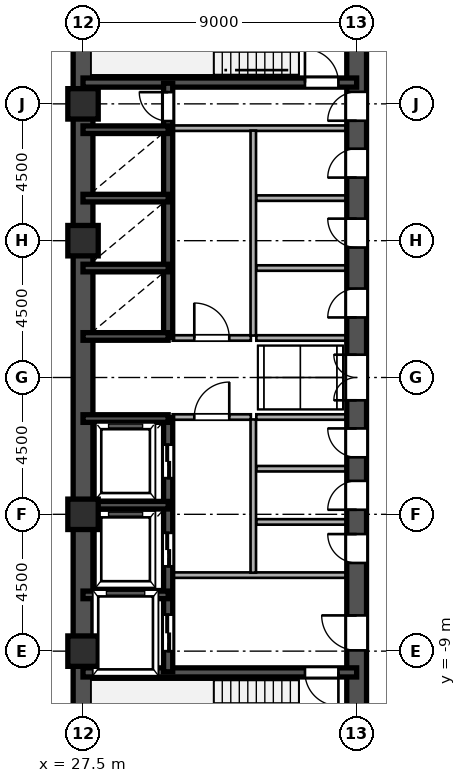
"""IFC4 building model, lengths in metres.
Left out: names, types, materials, properties, quantities, classifications, styles, units other than length and angle.
Written with IfcOpenShell. Run it as: python <this file> out.ifc"""

import sys

from ifc_helpers import new_model, si_unit, direction, frame, frame_2d, origin, origin_2d, place, context, subcontext, project, spatial, rectangle, hollow_rectangle, extrude, source, transform, mapped, element, fill, save


model = new_model("IFC4")
c1 = context("Model", 3, precision=1e-05, world=origin(), true_north=direction((0.0, 1.0)))
c2 = subcontext(c1, "Body", "Model", "MODEL_VIEW")
j1 = project(units=[si_unit("LENGTHUNIT", "METRE"), si_unit("PLANEANGLEUNIT", "RADIAN")], contexts=[c1])
p1 = place(None, origin())
s1 = spatial("IfcSite", under=j1, at=p1, CompositionType="ELEMENT")
p2 = place(p1, origin())
s2 = spatial("IfcBuilding", under=s1, at=p2, CompositionType="ELEMENT")
p3 = place(p2, frame((0.0, 0.0, 76.5)))
s3 = spatial("IfcBuildingStorey", under=s2, at=p3, CompositionType="ELEMENT", Elevation=76.5)
m1 = source(origin(), c2, "Body", "SweptSolid", [
    extrude(hollow_rectangle(XDim=1.0, YDim=1.0, WallThickness=0.042, at=origin_2d()), origin(), (0.0, 0.0, 1.0), 3.6),
])
for number, where, z_axis, x_axis in (
    (1, (27.5, -9.0, 0.0), (0.0, 0.0, 1.0), (1.0, 0.0, 0.0)),
    (2, (27.5, -4.5, 0.0), (0.0, 0.0, 1.0), (1.0, 0.0, 0.0)),
    (3, (27.5, 4.5, 0.0), (0.0, 0.0, 1.0), (1.0, 0.0, 0.0)),
    (4, (27.5, 9.0, 0.0), (0.0, 0.0, 1.0), (1.0, 0.0, 0.0)),
):
    element("IfcColumn", number, at=place(p3, frame(where, z_axis=z_axis, x_axis=x_axis)), inside=s3, PredefinedType="COLUMN", context=c2, shape_type="MappedRepresentation", body=[
        mapped(m1, transform((0.0, 0.0, 0.0), scale=1.0)),
    ])
for number, where, z_axis, x_axis in (
    (5, (27.5, -13.5, 0.0), (0.0, 0.0, 1.0), (0.0, 1.0, 0.0)),
    (6, (27.5, 1.3, 0.0), (0.0, 0.0, 1.0), (0.0, 1.0, 0.0)),
):
    element("IfcWall", number, at=place(p3, frame(where, z_axis=z_axis, x_axis=x_axis)), inside=s3, PredefinedType="SHEAR", context=c2, shape_type="SweptSolid", body=[
        extrude(rectangle(XDim=12.2, YDim=0.65, at=frame_2d((6.1, 0.0))), origin(), (0.0, 0.0, 1.0), 3.38),
    ])
p4 = place(p3, frame((27.5, -1.3, 0.0), z_axis=(0.0, 0.0, 1.0), x_axis=(0.0, 1.0, 0.0)))
e7 = element("IfcWall", 7, at=p4, inside=s3, PredefinedType="SHEAR", context=c2, shape_type="SweptSolid", body=[
    extrude(rectangle(XDim=2.6, YDim=0.65, at=frame_2d((1.3, 0.0))), origin(), (0.0, 0.0, 1.0), 3.38),
])
p5 = place(p3, frame((36.5, -13.65, 0.0), z_axis=(0.0, 0.0, 1.0), x_axis=(0.0, 1.0, 0.0)))
e8 = element("IfcWall", 8, at=p5, inside=s3, PredefinedType="SHEAR", context=c2, shape_type="SweptSolid", body=[
    extrude(rectangle(XDim=7.15, YDim=0.65, at=frame_2d((3.575, 0.0))), origin(), (0.0, 0.0, 1.0), 3.38),
])
p6 = place(p5, frame((4.675, 0.0, 0.0)))
e9 = element("IfcOpeningElement", 9, at=p6, cuts=e8, PredefinedType="OPENING", context=c2, shape_type="SweptSolid", body=[
    extrude(rectangle(XDim=1.15, YDim=2.2, at=frame_2d((0.575, 1.1))), frame((0.0, 0.335, 0.0), z_axis=(0.0, -1.0, 0.0), x_axis=(1.0, 0.0, 0.0)), (0.0, 0.0, 1.0), 0.67),
])
p7 = place(p3, frame((36.5, -1.3, 0.0), z_axis=(0.0, 0.0, 1.0), x_axis=(0.0, 1.0, 0.0)))
e10 = element("IfcWall", 10, at=p7, inside=s3, PredefinedType="SHEAR", context=c2, shape_type="SweptSolid", body=[
    extrude(rectangle(XDim=2.6, YDim=0.65, at=frame_2d((1.3, 0.0))), origin(), (0.0, 0.0, 1.0), 3.38),
])
p8 = place(p7, frame((0.55, 0.0, 0.0)))
e11 = element("IfcOpeningElement", 11, at=p8, cuts=e10, PredefinedType="OPENING", context=c2, shape_type="SweptSolid", body=[
    extrude(rectangle(XDim=1.5, YDim=2.3, at=frame_2d((0.75, 1.15))), frame((0.0, 0.335, 0.0), z_axis=(0.0, -1.0, 0.0), x_axis=(1.0, 0.0, 0.0)), (0.0, 0.0, 1.0), 0.67),
])
p9 = place(p3, frame((36.5, 8.2, 0.0), z_axis=(0.0, 0.0, 1.0), x_axis=(0.0, 1.0, 0.0)))
e12 = element("IfcWall", 12, at=p9, inside=s3, PredefinedType="SHEAR", context=c2, shape_type="SweptSolid", body=[
    extrude(rectangle(XDim=5.45, YDim=0.65, at=frame_2d((2.725, 0.0))), origin(), (0.0, 0.0, 1.0), 3.38),
])
p10 = place(p9, frame((0.245, 0.0, 0.0)))
e13 = element("IfcOpeningElement", 13, at=p10, cuts=e12, PredefinedType="OPENING", context=c2, shape_type="SweptSolid", body=[
    extrude(rectangle(XDim=0.95, YDim=2.15, at=frame_2d((0.475, 1.075))), frame((0.0, 0.335, 0.0), z_axis=(0.0, -1.0, 0.0), x_axis=(1.0, 0.0, 0.0)), (0.0, 0.0, 1.0), 0.67),
])
p11 = place(p3, frame((36.5, -6.5, 0.0), z_axis=(0.0, 0.0, 1.0), x_axis=(0.0, 1.0, 0.0)))
e14 = element("IfcWall", 14, at=p11, inside=s3, PredefinedType="SHEAR", context=c2, shape_type="SweptSolid", body=[
    extrude(rectangle(XDim=1.75, YDim=0.65, at=frame_2d((0.875, 0.0))), origin(), (0.0, 0.0, 1.0), 3.38),
])
p12 = place(p11, frame((0.4, 0.0, 0.0)))
e15 = element("IfcOpeningElement", 15, at=p12, cuts=e14, PredefinedType="OPENING", context=c2, shape_type="SweptSolid", body=[
    extrude(rectangle(XDim=0.95, YDim=2.15, at=frame_2d((0.475, 1.075))), frame((0.0, 0.335, 0.0), z_axis=(0.0, -1.0, 0.0), x_axis=(1.0, 0.0, 0.0)), (0.0, 0.0, 1.0), 0.67),
])
p13 = place(p3, frame((36.5, -4.75, 0.0), z_axis=(0.0, 0.0, 1.0), x_axis=(0.0, 1.0, 0.0)))
e16 = element("IfcWall", 16, at=p13, inside=s3, PredefinedType="SHEAR", context=c2, shape_type="SweptSolid", body=[
    extrude(rectangle(XDim=1.75, YDim=0.65, at=frame_2d((0.875, 0.0))), origin(), (0.0, 0.0, 1.0), 3.38),
])
p14 = place(p13, frame((0.4, 0.0, 0.0)))
e17 = element("IfcOpeningElement", 17, at=p14, cuts=e16, PredefinedType="OPENING", context=c2, shape_type="SweptSolid", body=[
    extrude(rectangle(XDim=0.95, YDim=2.15, at=frame_2d((0.475, 1.075))), frame((0.0, 0.335, 0.0), z_axis=(0.0, -1.0, 0.0), x_axis=(1.0, 0.0, 0.0)), (0.0, 0.0, 1.0), 0.67),
])
p15 = place(p3, frame((36.5, -3.0, 0.0), z_axis=(0.0, 0.0, 1.0), x_axis=(0.0, 1.0, 0.0)))
e18 = element("IfcWall", 18, at=p15, inside=s3, PredefinedType="SHEAR", context=c2, shape_type="SweptSolid", body=[
    extrude(rectangle(XDim=1.7, YDim=0.65, at=frame_2d((0.85, 0.0))), origin(), (0.0, 0.0, 1.0), 3.38),
])
p16 = place(p15, frame((0.375, 0.0, 0.0)))
e19 = element("IfcOpeningElement", 19, at=p16, cuts=e18, PredefinedType="OPENING", context=c2, shape_type="SweptSolid", body=[
    extrude(rectangle(XDim=0.95, YDim=2.15, at=frame_2d((0.475, 1.075))), frame((0.0, 0.335, 0.0), z_axis=(0.0, -1.0, 0.0), x_axis=(1.0, 0.0, 0.0)), (0.0, 0.0, 1.0), 0.67),
])
p17 = place(p3, frame((36.5, 1.3, 0.0), z_axis=(0.0, 0.0, 1.0), x_axis=(0.0, 1.0, 0.0)))
e20 = element("IfcWall", 20, at=p17, inside=s3, PredefinedType="SHEAR", context=c2, shape_type="SweptSolid", body=[
    extrude(rectangle(XDim=2.3, YDim=0.65, at=frame_2d((1.15, 0.0))), origin(), (0.0, 0.0, 1.0), 3.38),
])
p18 = place(p17, frame((0.675, 0.0, 0.0)))
e21 = element("IfcOpeningElement", 21, at=p18, cuts=e20, PredefinedType="OPENING", context=c2, shape_type="SweptSolid", body=[
    extrude(rectangle(XDim=0.95, YDim=2.15, at=frame_2d((0.475, 1.075))), frame((0.0, 0.335, 0.0), z_axis=(0.0, -1.0, 0.0), x_axis=(1.0, 0.0, 0.0)), (0.0, 0.0, 1.0), 0.67),
])
p19 = place(p3, frame((36.5, 3.6, 0.0), z_axis=(0.0, 0.0, 1.0), x_axis=(0.0, 1.0, 0.0)))
e22 = element("IfcWall", 22, at=p19, inside=s3, PredefinedType="SHEAR", context=c2, shape_type="SweptSolid", body=[
    extrude(rectangle(XDim=2.3, YDim=0.65, at=frame_2d((1.15, 0.0))), origin(), (0.0, 0.0, 1.0), 3.38),
])
p20 = place(p19, frame((0.675, 0.0, 0.0)))
e23 = element("IfcOpeningElement", 23, at=p20, cuts=e22, PredefinedType="OPENING", context=c2, shape_type="SweptSolid", body=[
    extrude(rectangle(XDim=0.95, YDim=2.15, at=frame_2d((0.475, 1.075))), frame((0.0, 0.335, 0.0), z_axis=(0.0, -1.0, 0.0), x_axis=(1.0, 0.0, 0.0)), (0.0, 0.0, 1.0), 0.67),
])
p21 = place(p3, frame((36.5, 5.9, 0.0), z_axis=(0.0, 0.0, 1.0), x_axis=(0.0, 1.0, 0.0)))
e24 = element("IfcWall", 24, at=p21, inside=s3, PredefinedType="SHEAR", context=c2, shape_type="SweptSolid", body=[
    extrude(rectangle(XDim=2.3, YDim=0.65, at=frame_2d((1.15, 0.0))), origin(), (0.0, 0.0, 1.0), 3.38),
])
p22 = place(p21, frame((0.675, 0.0, 0.0)))
e25 = element("IfcOpeningElement", 25, at=p22, cuts=e24, PredefinedType="OPENING", context=c2, shape_type="SweptSolid", body=[
    extrude(rectangle(XDim=0.95, YDim=2.15, at=frame_2d((0.475, 1.075))), frame((0.0, 0.335, 0.0), z_axis=(0.0, -1.0, 0.0), x_axis=(1.0, 0.0, 0.0)), (0.0, 0.0, 1.0), 0.67),
])
p23 = place(p3, frame((27.5, -9.7, 0.0), z_axis=(0.0, 0.0, 1.0), x_axis=(1.0, 0.0, 0.0)))
e26 = element("IfcWall", 26, at=p23, inside=s3, PredefinedType="SHEAR", context=c2, shape_type="SweptSolid", body=[
    extrude(rectangle(XDim=9.0, YDim=0.3, at=frame_2d((4.5, 0.0))), origin(), (0.0, 0.0, 1.0), 3.38),
])
p24 = place(p23, frame((7.3, 0.0, 0.0)))
e27 = element("IfcOpeningElement", 27, at=p24, cuts=e26, PredefinedType="OPENING", context=c2, shape_type="SweptSolid", body=[
    extrude(rectangle(XDim=1.1, YDim=2.2, at=frame_2d((0.55, 1.1))), frame((0.0, 0.16, 0.0), z_axis=(0.0, -1.0, 0.0), x_axis=(1.0, 0.0, 0.0)), (0.0, 0.0, 1.0), 0.32),
])
p25 = place(p3, frame((27.5, 9.7, 0.0), z_axis=(0.0, 0.0, 1.0), x_axis=(1.0, 0.0, 0.0)))
e28 = element("IfcWall", 28, at=p25, inside=s3, PredefinedType="SHEAR", context=c2, shape_type="SweptSolid", body=[
    extrude(rectangle(XDim=9.0, YDim=0.3, at=frame_2d((4.5, 0.0))), origin(), (0.0, 0.0, 1.0), 3.38),
])
p26 = place(p25, frame((7.3, 0.0, 0.0)))
e29 = element("IfcOpeningElement", 29, at=p26, cuts=e28, PredefinedType="OPENING", context=c2, shape_type="SweptSolid", body=[
    extrude(rectangle(XDim=1.1, YDim=2.2, at=frame_2d((0.55, 1.1))), frame((0.0, 0.16, 0.0), z_axis=(0.0, -1.0, 0.0), x_axis=(1.0, 0.0, 0.0)), (0.0, 0.0, 1.0), 0.32),
])
for number, where, z_axis, x_axis in (
    (30, (27.5, -7.15, 0.0), (0.0, 0.0, 1.0), (1.0, 0.0, 0.0)),
    (31, (27.5, -4.2, 0.0), (0.0, 0.0, 1.0), (1.0, 0.0, 0.0)),
    (32, (27.5, -1.35, 0.0), (0.0, 0.0, 1.0), (1.0, 0.0, 0.0)),
    (33, (27.5, 1.35, 0.0), (0.0, 0.0, 1.0), (1.0, 0.0, 0.0)),
    (34, (27.5, 3.6, 0.0), (0.0, 0.0, 1.0), (1.0, 0.0, 0.0)),
    (35, (27.5, 5.9, 0.0), (0.0, 0.0, 1.0), (1.0, 0.0, 0.0)),
    (36, (27.5, 8.15, 0.0), (0.0, 0.0, 1.0), (1.0, 0.0, 0.0)),
):
    element("IfcWall", number, at=place(p3, frame(where, z_axis=z_axis, x_axis=x_axis)), inside=s3, PredefinedType="SHEAR", context=c2, shape_type="SweptSolid", body=[
        extrude(rectangle(XDim=2.8, YDim=0.25, at=frame_2d((1.4, 0.0))), origin(), (0.0, 0.0, 1.0), 3.38),
    ])
p27 = place(p3, frame((30.3, -9.68, 0.0), z_axis=(0.0, 0.0, 1.0), x_axis=(0.0, 1.0, 0.0)))
e37 = element("IfcWall", 37, at=p27, inside=s3, PredefinedType="SHEAR", context=c2, shape_type="SweptSolid", body=[
    extrude(rectangle(XDim=2.56, YDim=0.3, at=frame_2d((1.28, 0.0))), origin(), (0.0, 0.0, 1.0), 3.38),
])
p28 = place(p27, frame((0.68, 0.0, 0.0)))
e38 = element("IfcOpeningElement", 38, at=p28, cuts=e37, PredefinedType="OPENING", context=c2, shape_type="SweptSolid", body=[
    extrude(rectangle(XDim=1.2, YDim=2.25, at=frame_2d((0.6, 1.125))), frame((0.0, 0.16, 0.0), z_axis=(0.0, -1.0, 0.0), x_axis=(1.0, 0.0, 0.0)), (0.0, 0.0, 1.0), 0.32),
])
p29 = place(p3, frame((30.3, -7.12, 0.0), z_axis=(0.0, 0.0, 1.0), x_axis=(0.0, 1.0, 0.0)))
e39 = element("IfcWall", 39, at=p29, inside=s3, PredefinedType="SHEAR", context=c2, shape_type="SweptSolid", body=[
    extrude(rectangle(XDim=2.92, YDim=0.3, at=frame_2d((1.46, 0.0))), origin(), (0.0, 0.0, 1.0), 3.38),
])
p30 = place(p29, frame((0.91, 0.0, 0.0)))
e40 = element("IfcOpeningElement", 40, at=p30, cuts=e39, PredefinedType="OPENING", context=c2, shape_type="SweptSolid", body=[
    extrude(rectangle(XDim=1.1, YDim=2.2, at=frame_2d((0.55, 1.1))), frame((0.0, 0.16, 0.0), z_axis=(0.0, -1.0, 0.0), x_axis=(1.0, 0.0, 0.0)), (0.0, 0.0, 1.0), 0.32),
])
p31 = place(p3, frame((30.3, -4.2, 0.0), z_axis=(0.0, 0.0, 1.0), x_axis=(0.0, 1.0, 0.0)))
e41 = element("IfcWall", 41, at=p31, inside=s3, PredefinedType="SHEAR", context=c2, shape_type="SweptSolid", body=[
    extrude(rectangle(XDim=2.88, YDim=0.3, at=frame_2d((1.44, 0.0))), origin(), (0.0, 0.0, 1.0), 3.38),
])
p32 = place(p31, frame((0.89, 0.0, 0.0)))
e42 = element("IfcOpeningElement", 42, at=p32, cuts=e41, PredefinedType="OPENING", context=c2, shape_type="SweptSolid", body=[
    extrude(rectangle(XDim=1.1, YDim=2.2, at=frame_2d((0.55, 1.1))), frame((0.0, 0.16, 0.0), z_axis=(0.0, -1.0, 0.0), x_axis=(1.0, 0.0, 0.0)), (0.0, 0.0, 1.0), 0.32),
])
p33 = place(p3, frame((30.3, 1.32, 0.0), z_axis=(0.0, 0.0, 1.0), x_axis=(0.0, 1.0, 0.0)))
e43 = element("IfcWall", 43, at=p33, inside=s3, PredefinedType="SHEAR", context=c2, shape_type="SweptSolid", body=[
    extrude(rectangle(XDim=2.28, YDim=0.3, at=frame_2d((1.14, 0.0))), origin(), (0.0, 0.0, 1.0), 3.38),
])
p34 = place(p3, frame((30.3, 3.6, 0.0), z_axis=(0.0, 0.0, 1.0), x_axis=(0.0, 1.0, 0.0)))
e44 = element("IfcWall", 44, at=p34, inside=s3, PredefinedType="SHEAR", context=c2, shape_type="SweptSolid", body=[
    extrude(rectangle(XDim=2.3, YDim=0.3, at=frame_2d((1.15, 0.0))), origin(), (0.0, 0.0, 1.0), 3.38),
])
p35 = place(p3, frame((30.3, 5.9, 0.0), z_axis=(0.0, 0.0, 1.0), x_axis=(0.0, 1.0, 0.0)))
e45 = element("IfcWall", 45, at=p35, inside=s3, PredefinedType="SHEAR", context=c2, shape_type="SweptSolid", body=[
    extrude(rectangle(XDim=2.25, YDim=0.3, at=frame_2d((1.125, 0.0))), origin(), (0.0, 0.0, 1.0), 3.38),
])
p36 = place(p3, frame((30.3, 8.15, 0.0), z_axis=(0.0, 0.0, 1.0), x_axis=(0.0, 1.0, 0.0)))
e46 = element("IfcWall", 46, at=p36, inside=s3, PredefinedType="SHEAR", context=c2, shape_type="SweptSolid", body=[
    extrude(rectangle(XDim=1.53, YDim=0.3, at=frame_2d((0.765, 0.0))), origin(), (0.0, 0.0, 1.0), 3.38),
])
p37 = place(p36, frame((0.285, 0.0, 0.0)))
e47 = element("IfcOpeningElement", 47, at=p37, cuts=e46, PredefinedType="OPENING", context=c2, shape_type="SweptSolid", body=[
    extrude(rectangle(XDim=0.95, YDim=2.15, at=frame_2d((0.475, 1.075))), frame((0.0, 0.16, 0.0), z_axis=(0.0, -1.0, 0.0), x_axis=(1.0, 0.0, 0.0)), (0.0, 0.0, 1.0), 0.32),
])
for number, where, z_axis, x_axis in (
    (48, (30.45, -6.5, 0.0), (0.0, 0.0, 1.0), (1.0, 0.0, 0.0)),
    (49, (30.45, 8.2, 0.0), (0.0, 0.0, 1.0), (1.0, 0.0, 0.0)),
):
    element("IfcWall", number, at=place(p3, frame(where, z_axis=z_axis, x_axis=x_axis)), inside=s3, PredefinedType="PARTITIONING", context=c2, shape_type="SweptSolid", body=[
        extrude(rectangle(XDim=5.7, YDim=0.18, at=frame_2d((2.85, 0.0))), origin(), (0.0, 0.0, 1.0), 3.38),
    ])
p38 = place(p3, frame((33.1, -6.42, 0.0), z_axis=(0.0, 0.0, 1.0), x_axis=(0.0, 1.0, 0.0)))
e50 = element("IfcWall", 50, at=p38, inside=s3, PredefinedType="PARTITIONING", context=c2, shape_type="SweptSolid", body=[
    extrude(rectangle(XDim=5.04, YDim=0.18, at=frame_2d((2.52, 0.0))), origin(), (0.0, 0.0, 1.0), 3.38),
])
p39 = place(p3, frame((33.1, 1.38, 0.0), z_axis=(0.0, 0.0, 1.0), x_axis=(0.0, 1.0, 0.0)))
e51 = element("IfcWall", 51, at=p39, inside=s3, PredefinedType="PARTITIONING", context=c2, shape_type="SweptSolid", body=[
    extrude(rectangle(XDim=6.74, YDim=0.18, at=frame_2d((3.37, 0.0))), origin(), (0.0, 0.0, 1.0), 3.38),
])
p40 = place(p3, frame((30.45, -1.3, 0.0), z_axis=(0.0, 0.0, 1.0), x_axis=(1.0, 0.0, 0.0)))
e52 = element("IfcWall", 52, at=p40, inside=s3, PredefinedType="PARTITIONING", context=c2, shape_type="SweptSolid", body=[
    extrude(rectangle(XDim=2.57, YDim=0.18, at=frame_2d((1.285, 0.0))), origin(), (0.0, 0.0, 1.0), 3.38),
])
p41 = place(p40, frame((0.71, 0.0, 0.0)))
e53 = element("IfcOpeningElement", 53, at=p41, cuts=e52, PredefinedType="OPENING", context=c2, shape_type="SweptSolid", body=[
    extrude(rectangle(XDim=1.15, YDim=2.2, at=frame_2d((0.575, 1.1))), frame((0.0, 0.1, 0.0), z_axis=(0.0, -1.0, 0.0), x_axis=(1.0, 0.0, 0.0)), (0.0, 0.0, 1.0), 0.2),
])
p42 = place(p3, frame((30.45, 1.3, 0.0), z_axis=(0.0, 0.0, 1.0), x_axis=(1.0, 0.0, 0.0)))
e54 = element("IfcWall", 54, at=p42, inside=s3, PredefinedType="PARTITIONING", context=c2, shape_type="SweptSolid", body=[
    extrude(rectangle(XDim=2.57, YDim=0.18, at=frame_2d((1.285, 0.0))), origin(), (0.0, 0.0, 1.0), 3.38),
])
p43 = place(p42, frame((0.71, 0.0, 0.0)))
e55 = element("IfcOpeningElement", 55, at=p43, cuts=e54, PredefinedType="OPENING", context=c2, shape_type="SweptSolid", body=[
    extrude(rectangle(XDim=1.15, YDim=2.2, at=frame_2d((0.575, 1.1))), frame((0.0, 0.1, 0.0), z_axis=(0.0, -1.0, 0.0), x_axis=(1.0, 0.0, 0.0)), (0.0, 0.0, 1.0), 0.2),
])
for number, where, z_axis, x_axis in (
    (56, (33.2, -1.3, 0.0), (0.0, 0.0, 1.0), (1.0, 0.0, 0.0)),
    (57, (33.2, 1.3, 0.0), (0.0, 0.0, 1.0), (1.0, 0.0, 0.0)),
    (58, (33.2, -4.75, 0.0), (0.0, 0.0, 1.0), (1.0, 0.0, 0.0)),
    (59, (33.2, -3.0, 0.0), (0.0, 0.0, 1.0), (1.0, 0.0, 0.0)),
    (60, (33.2, 3.6, 0.0), (0.0, 0.0, 1.0), (1.0, 0.0, 0.0)),
    (61, (33.2, 5.9, 0.0), (0.0, 0.0, 1.0), (1.0, 0.0, 0.0)),
):
    element("IfcWall", number, at=place(p3, frame(where, z_axis=z_axis, x_axis=x_axis)), inside=s3, PredefinedType="PARTITIONING", context=c2, shape_type="SweptSolid", body=[
        extrude(rectangle(XDim=2.95, YDim=0.18, at=frame_2d((1.475, 0.0))), origin(), (0.0, 0.0, 1.0), 3.38),
    ])
m2 = source(origin(), c2, "Body", "SweptSolid", [
    extrude(rectangle(XDim=1.15, YDim=2.2, at=frame_2d((0.575, 1.1))), frame((0.0, 0.025, 0.0), z_axis=(0.0, -1.0, 0.0), x_axis=(1.0, 0.0, 0.0)), (0.0, 0.0, 1.0), 0.05),
])
p44 = place(p6, origin())
e62 = element("IfcDoor", 62, at=p44, inside=s3, OperationType="SINGLE_SWING_RIGHT", PredefinedType="DOOR", context=c2, shape_type="MappedRepresentation", body=[
    mapped(m2, transform((0.0, 0.0, 0.0), scale=1.0)),
])
fill(e9, e62)
m3 = source(origin(), c2, "Body", "SweptSolid", [
    extrude(rectangle(XDim=1.5, YDim=2.3, at=frame_2d((0.75, 1.15))), frame((0.0, 0.025, 0.0), z_axis=(0.0, -1.0, 0.0), x_axis=(1.0, 0.0, 0.0)), (0.0, 0.0, 1.0), 0.05),
])
p45 = place(p8, origin())
e63 = element("IfcDoor", 63, at=p45, inside=s3, OperationType="DOUBLE_SWING_LEFT", PredefinedType="DOOR", context=c2, shape_type="MappedRepresentation", body=[
    mapped(m3, transform((0.0, 0.0, 0.0), scale=1.0)),
])
fill(e11, e63)
m4 = source(origin(), c2, "Body", "SweptSolid", [
    extrude(rectangle(XDim=0.95, YDim=2.15, at=frame_2d((0.475, 1.075))), frame((0.0, 0.025, 0.0), z_axis=(0.0, -1.0, 0.0), x_axis=(1.0, 0.0, 0.0)), (0.0, 0.0, 1.0), 0.05),
])
p46 = place(p10, origin())
e64 = element("IfcDoor", 64, at=p46, inside=s3, OperationType="SINGLE_SWING_LEFT", PredefinedType="DOOR", context=c2, shape_type="MappedRepresentation", body=[
    mapped(m4, transform((0.0, 0.0, 0.0), scale=1.0)),
])
fill(e13, e64)
p47 = place(p12, origin())
e65 = element("IfcDoor", 65, at=p47, inside=s3, OperationType="SINGLE_SWING_RIGHT", PredefinedType="DOOR", context=c2, shape_type="MappedRepresentation", body=[
    mapped(m4, transform((0.0, 0.0, 0.0), scale=1.0)),
])
fill(e15, e65)
p48 = place(p14, origin())
e66 = element("IfcDoor", 66, at=p48, inside=s3, OperationType="SINGLE_SWING_LEFT", PredefinedType="DOOR", context=c2, shape_type="MappedRepresentation", body=[
    mapped(m4, transform((0.0, 0.0, 0.0), scale=1.0)),
])
fill(e17, e66)
p49 = place(p16, origin())
e67 = element("IfcDoor", 67, at=p49, inside=s3, OperationType="SINGLE_SWING_RIGHT", PredefinedType="DOOR", context=c2, shape_type="MappedRepresentation", body=[
    mapped(m4, transform((0.0, 0.0, 0.0), scale=1.0)),
])
fill(e19, e67)
p50 = place(p18, origin())
e68 = element("IfcDoor", 68, at=p50, inside=s3, OperationType="SINGLE_SWING_LEFT", PredefinedType="DOOR", context=c2, shape_type="MappedRepresentation", body=[
    mapped(m4, transform((0.0, 0.0, 0.0), scale=1.0)),
])
fill(e21, e68)
p51 = place(p20, origin())
e69 = element("IfcDoor", 69, at=p51, inside=s3, OperationType="SINGLE_SWING_RIGHT", PredefinedType="DOOR", context=c2, shape_type="MappedRepresentation", body=[
    mapped(m4, transform((0.0, 0.0, 0.0), scale=1.0)),
])
fill(e23, e69)
p52 = place(p22, origin())
e70 = element("IfcDoor", 70, at=p52, inside=s3, OperationType="SINGLE_SWING_LEFT", PredefinedType="DOOR", context=c2, shape_type="MappedRepresentation", body=[
    mapped(m4, transform((0.0, 0.0, 0.0), scale=1.0)),
])
fill(e25, e70)
m5 = source(origin(), c2, "Body", "SweptSolid", [
    extrude(rectangle(XDim=1.1, YDim=2.2, at=frame_2d((0.55, 1.1))), frame((0.0, 0.025, 0.0), z_axis=(0.0, -1.0, 0.0), x_axis=(1.0, 0.0, 0.0)), (0.0, 0.0, 1.0), 0.05),
])
p53 = place(p24, frame((1.1, 0.0, 0.0), z_axis=(0.0, 0.0, 1.0), x_axis=(-1.0, 0.0, 0.0)))
e71 = element("IfcDoor", 71, at=p53, inside=s3, OperationType="SINGLE_SWING_RIGHT", PredefinedType="DOOR", context=c2, shape_type="MappedRepresentation", body=[
    mapped(m5, transform((0.0, 0.0, 0.0), scale=1.0)),
])
fill(e27, e71)
p54 = place(p26, origin())
e72 = element("IfcDoor", 72, at=p54, inside=s3, OperationType="SINGLE_SWING_LEFT", PredefinedType="DOOR", context=c2, shape_type="MappedRepresentation", body=[
    mapped(m5, transform((0.0, 0.0, 0.0), scale=1.0)),
])
fill(e29, e72)
m6 = source(origin(), c2, "Body", "SweptSolid", [
    extrude(rectangle(XDim=1.2, YDim=2.25, at=frame_2d((0.6, 1.125))), frame((0.0, 0.025, 0.0), z_axis=(0.0, -1.0, 0.0), x_axis=(1.0, 0.0, 0.0)), (0.0, 0.0, 1.0), 0.05),
])
p55 = place(p28, origin())
e73 = element("IfcDoor", 73, at=p55, inside=s3, OperationType="DOUBLE_DOOR_SLIDING", PredefinedType="DOOR", context=c2, shape_type="MappedRepresentation", body=[
    mapped(m6, transform((0.0, 0.0, 0.0), scale=1.0)),
])
fill(e38, e73)
m7 = source(origin(), c2, "Body", "SweptSolid", [
    extrude(rectangle(XDim=1.1, YDim=2.2, at=frame_2d((0.55, 1.1))), frame((0.0, 0.025, 0.0), z_axis=(0.0, -1.0, 0.0), x_axis=(1.0, 0.0, 0.0)), (0.0, 0.0, 1.0), 0.05),
])
p56 = place(p30, origin())
e74 = element("IfcDoor", 74, at=p56, inside=s3, OperationType="DOUBLE_DOOR_SLIDING", PredefinedType="DOOR", context=c2, shape_type="MappedRepresentation", body=[
    mapped(m7, transform((0.0, 0.0, 0.0), scale=1.0)),
])
fill(e40, e74)
p57 = place(p32, origin())
e75 = element("IfcDoor", 75, at=p57, inside=s3, OperationType="DOUBLE_DOOR_SLIDING", PredefinedType="DOOR", context=c2, shape_type="MappedRepresentation", body=[
    mapped(m7, transform((0.0, 0.0, 0.0), scale=1.0)),
])
fill(e42, e75)
p58 = place(p37, origin())
e76 = element("IfcDoor", 76, at=p58, inside=s3, OperationType="SINGLE_SWING_RIGHT", PredefinedType="DOOR", context=c2, shape_type="MappedRepresentation", body=[
    mapped(m4, transform((0.0, 0.0, 0.0), scale=1.0)),
])
fill(e47, e76)
p59 = place(p41, origin())
e77 = element("IfcDoor", 77, at=p59, inside=s3, OperationType="SINGLE_SWING_RIGHT", PredefinedType="DOOR", context=c2, shape_type="MappedRepresentation", body=[
    mapped(m2, transform((0.0, 0.0, 0.0), scale=1.0)),
])
fill(e53, e77)
p60 = place(p43, origin())
e78 = element("IfcDoor", 78, at=p60, inside=s3, OperationType="SINGLE_SWING_LEFT", PredefinedType="DOOR", context=c2, shape_type="MappedRepresentation", body=[
    mapped(m2, transform((0.0, 0.0, 0.0), scale=1.0)),
])
fill(e55, e78)
save(model, sys.argv[1])
